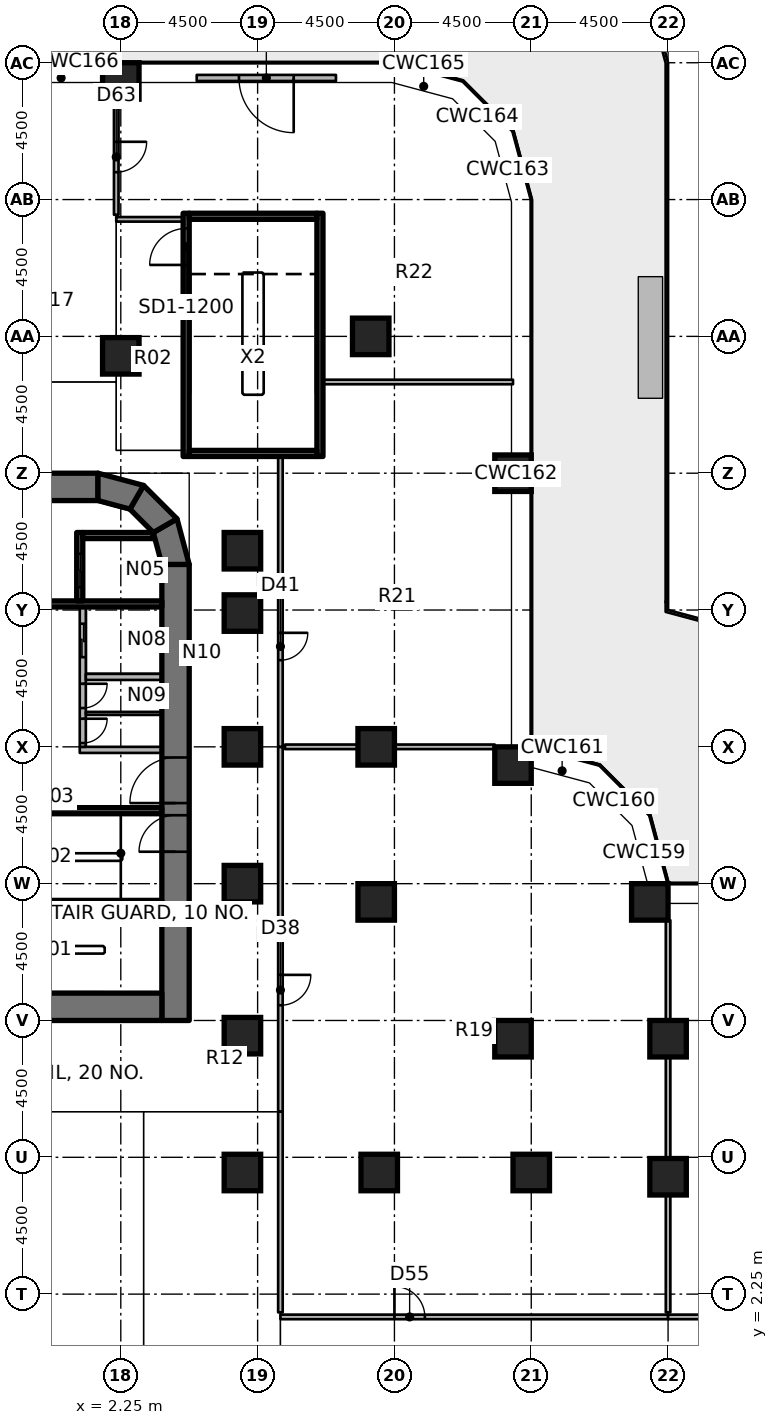
"""IFC4 building model, lengths in metres.
Left out: names, types, materials, properties, quantities, classifications, styles, units other than length and angle.
Written with IfcOpenShell. Run it as: python <this file> out.ifc"""

import sys

from ifc_helpers import new_model, si_unit, direction, frame, frame_2d, origin, origin_2d, place, context, subcontext, project, spatial, polyline, rectangle, outline, extrude, element, fill, save


model = new_model("IFC4")
c1 = context("Model", 3, precision=1e-05, world=origin(), true_north=direction((0.0, 1.0)))
c2 = subcontext(c1, "Body", "Model", "MODEL_VIEW")
j1 = project(units=[si_unit("LENGTHUNIT", "METRE"), si_unit("PLANEANGLEUNIT", "RADIAN")], contexts=[c1])
p1 = place(None, origin())
s1 = spatial("IfcSite", under=j1, at=p1, CompositionType="ELEMENT")
p2 = place(p1, origin())
s2 = spatial("IfcBuilding", under=s1, at=p2, CompositionType="ELEMENT")
p3 = place(p2, frame((0.0, 0.0, 17.0)))
s3 = spatial("IfcBuildingStorey", under=s2, at=p3, CompositionType="ELEMENT", Elevation=17.0)
for number, where, z_axis, x_axis in (
    (1, (2.25, 33.11, 0.0), (0.0, 0.0, 1.0), (1.0, 0.0, 0.0)),
    (2, (2.25, 42.15, 0.0), (0.0, 0.0, 1.0), (1.0, 0.0, 0.0)),
    (3, (6.25, 6.25, 0.0), (0.0, 0.0, 1.0), (1.0, 0.0, 0.0)),
    (4, (6.25, 10.75, 0.0), (0.0, 0.0, 1.0), (1.0, 0.0, 0.0)),
    (5, (6.25, 15.75, 0.0), (0.0, 0.0, 1.0), (1.0, 0.0, 0.0)),
    (6, (6.25, 20.25, 0.0), (0.0, 0.0, 1.0), (1.0, 0.0, 0.0)),
    (7, (6.25, 24.65, 0.0), (0.0, 0.0, 1.0), (1.0, 0.0, 0.0)),
    (8, (6.25, 26.7, 0.0), (0.0, 0.0, 1.0), (1.0, 0.0, 0.0)),
    (9, (10.75, 6.25, 0.0), (0.0, 0.0, 1.0), (1.0, 0.0, 0.0)),
    (10, (10.65, 15.15, 0.0), (0.0, 0.0, 1.0), (1.0, 0.0, 0.0)),
    (11, (10.65, 20.25, 0.0), (0.0, 0.0, 1.0), (1.0, 0.0, 0.0)),
    (12, (10.47, 33.75, 0.0), (0.0, 0.0, 1.0), (1.0, 0.0, 0.0)),
    (13, (15.75, 6.25, 0.0), (0.0, 0.0, 1.0), (1.0, 0.0, 0.0)),
    (14, (15.15, 10.65, 0.0), (0.0, 0.0, 1.0), (1.0, 0.0, 0.0)),
    (15, (15.15, 19.65, 0.0), (0.0, 0.0, 1.0), (1.0, 0.0, 0.0)),
    (16, (15.15, 29.25, 0.0), (0.0, 0.0, 1.0), (1.0, 0.0, 0.0)),
    (17, (20.25, 6.11, 0.0), (0.0, 0.0, 1.0), (1.0, 0.0, 0.0)),
    (18, (20.25, 10.65, 0.0), (0.0, 0.0, 1.0), (1.0, 0.0, 0.0)),
    (19, (19.65, 15.15, 0.0), (0.0, 0.0, 1.0), (1.0, 0.0, 0.0)),
):
    element("IfcColumn", number, at=place(p3, frame(where, z_axis=z_axis, x_axis=x_axis)), inside=s3, PredefinedType="COLUMN", context=c2, shape_type="SweptSolid", body=[
        extrude(rectangle(XDim=1.2, YDim=1.2, at=origin_2d()), origin(), (0.0, 0.0, 1.0), 4.55),
    ])
p4 = place(p3, frame((4.05, 11.25, 0.0), z_axis=(0.0, 0.0, 1.0), x_axis=(0.0, 1.0, 0.0)))
e20 = element("IfcWall", 20, at=p4, inside=s3, PredefinedType="SHEAR", context=c2, shape_type="SweptSolid", body=[
    extrude(rectangle(XDim=15.0, YDim=0.9, at=frame_2d((7.5, 0.0))), origin(), (0.0, 0.0, 1.0), 5.0),
])
p5 = place(p4, frame((7.15, 0.0, 0.0)))
e21 = element("IfcOpeningElement", 21, at=p5, cuts=e20, PredefinedType="OPENING", context=c2, shape_type="SweptSolid", body=[
    extrude(rectangle(XDim=1.5, YDim=2.3, at=frame_2d((0.75, 1.15))), frame((0.0, 0.46, 0.0), z_axis=(0.0, -1.0, 0.0), x_axis=(1.0, 0.0, 0.0)), (0.0, 0.0, 1.0), 0.92),
])
p6 = place(p4, frame((5.55, 0.0, 0.0)))
e22 = element("IfcOpeningElement", 22, at=p6, cuts=e20, PredefinedType="OPENING", context=c2, shape_type="SweptSolid", body=[
    extrude(rectangle(XDim=1.2, YDim=2.1, at=frame_2d((0.6, 1.05))), frame((0.0, 0.46, 0.0), z_axis=(0.0, -1.0, 0.0), x_axis=(1.0, 0.0, 0.0)), (0.0, 0.0, 1.0), 0.92),
])
p7 = place(p3, frame((-3.6, 11.7, 0.0), z_axis=(0.0, 0.0, 1.0), x_axis=(1.0, 0.0, 0.0)))
e23 = element("IfcWall", 23, at=p7, inside=s3, PredefinedType="SHEAR", context=c2, shape_type="SweptSolid", body=[
    extrude(rectangle(XDim=7.2, YDim=0.9, at=frame_2d((3.6, 0.0))), origin(), (0.0, 0.0, 1.0), 5.0),
])
p8 = place(p3, frame((-1.5, 28.8, 0.0), z_axis=(0.0, 0.0, 1.0), x_axis=(1.0, 0.0, 0.0)))
e24 = element("IfcWall", 24, at=p8, inside=s3, PredefinedType="SHEAR", context=c2, shape_type="SweptSolid", body=[
    extrude(rectangle(XDim=3.0, YDim=0.9, at=frame_2d((1.5, 0.0))), origin(), (0.0, 0.0, 1.0), 5.0),
])
p9 = place(p3, origin())
e25 = element("IfcWall", 25, at=p9, inside=s3, PredefinedType="SHEAR", context=c2, shape_type="SweptSolid", body=[
    extrude(outline(polyline([(4.5, 26.25), (4.098, 27.75), (3.319, 27.3), (3.6, 26.25), (4.5, 26.25)])), origin(), (0.0, 0.0, 1.0), 5.0),
])
p10 = place(p3, origin())
e26 = element("IfcWall", 26, at=p10, inside=s3, PredefinedType="SHEAR", context=c2, shape_type="SweptSolid", body=[
    extrude(outline(polyline([(4.098, 27.75), (3.0, 28.848), (2.55, 28.069), (3.319, 27.3), (4.098, 27.75)])), origin(), (0.0, 0.0, 1.0), 5.0),
])
p11 = place(p3, origin())
e27 = element("IfcWall", 27, at=p11, inside=s3, PredefinedType="SHEAR", context=c2, shape_type="SweptSolid", body=[
    extrude(outline(polyline([(3.0, 28.848), (1.5, 29.25), (1.5, 28.35), (2.55, 28.069), (3.0, 28.848)])), origin(), (0.0, 0.0, 1.0), 5.0),
])
p12 = place(p3, frame((9.327, 42.25, 0.0), z_axis=(0.0, 0.0, 1.0), x_axis=(-1.0, 0.0, 0.0)))
e28 = element("IfcWall", 28, at=p12, inside=s3, PredefinedType="SOLIDWALL", context=c2, shape_type="SweptSolid", body=[
    extrude(rectangle(XDim=4.58, YDim=0.2, at=frame_2d((2.29, 0.0))), origin(), (0.0, 0.0, 1.0), 4.55),
])
p13 = place(p12, frame((1.39, 0.0, 0.0)))
e29 = element("IfcOpeningElement", 29, at=p13, cuts=e28, PredefinedType="OPENING", context=c2, shape_type="SweptSolid", body=[
    extrude(rectangle(XDim=1.8, YDim=2.4, at=frame_2d((0.9, 1.2))), frame((0.0, 0.11, 0.0), z_axis=(0.0, -1.0, 0.0), x_axis=(1.0, 0.0, 0.0)), (0.0, 0.0, 1.0), 0.22),
])
p14 = place(p3, frame((-3.6, 24.95, 0.0), z_axis=(0.0, 0.0, 1.0), x_axis=(1.0, 0.0, 0.0)))
e30 = element("IfcWall", 30, at=p14, inside=s3, PredefinedType="SHEAR", context=c2, shape_type="SweptSolid", body=[
    extrude(rectangle(XDim=7.2, YDim=0.2, at=frame_2d((3.6, 0.0))), origin(), (0.0, 0.0, 1.0), 4.55),
])
p15 = place(p3, frame((0.9, 27.3, 0.0), z_axis=(0.0, 0.0, 1.0), x_axis=(0.0, -1.0, 0.0)))
e31 = element("IfcWall", 31, at=p15, inside=s3, PredefinedType="SHEAR", context=c2, shape_type="SweptSolid", body=[
    extrude(rectangle(XDim=2.25, YDim=0.2, at=frame_2d((1.125, 0.0))), origin(), (0.0, 0.0, 1.0), 4.55),
])
p16 = place(p15, frame((0.7, 0.0, 0.0)))
e32 = element("IfcOpeningElement", 32, at=p16, cuts=e31, PredefinedType="OPENING", context=c2, shape_type="SweptSolid", body=[
    extrude(rectangle(XDim=1.1, YDim=2.3, at=frame_2d((0.55, 1.15))), frame((0.0, 0.11, 0.0), z_axis=(0.0, -1.0, 0.0), x_axis=(1.0, 0.0, 0.0)), (0.0, 0.0, 1.0), 0.22),
])
p17 = place(p3, origin())
e33 = element("IfcWall", 33, at=p17, inside=s3, PredefinedType="SHEAR", context=c2, shape_type="SweptSolid", body=[
    extrude(outline(polyline([(1.0, 27.1), (3.341, 27.1), (3.291, 27.284), (3.275, 27.3), (1.0, 27.3), (1.0, 27.1)])), origin(), (0.0, 0.0, 1.0), 4.55),
])
for number, where, z_axis, x_axis in (
    (34, (-3.6, 18.15, 0.0), (0.0, 0.0, 1.0), (1.0, 0.0, 0.0)),
    (35, (-3.6, 15.1, 0.0), (0.0, 0.0, 1.0), (1.0, 0.0, 0.0)),
):
    element("IfcWall", number, at=place(p3, frame(where, z_axis=z_axis, x_axis=x_axis)), inside=s3, PredefinedType="SHEAR", context=c2, shape_type="SweptSolid", body=[
        extrude(rectangle(XDim=7.2, YDim=0.2, at=frame_2d((3.6, 0.0))), origin(), (0.0, 0.0, 1.0), 4.55),
    ])
p18 = place(p3, frame((0.9, 20.15, 0.0), z_axis=(0.0, 0.0, 1.0), x_axis=(1.0, 0.0, 0.0)))
e36 = element("IfcWall", 36, at=p18, inside=s3, PredefinedType="PARTITIONING", context=c2, shape_type="SweptSolid", body=[
    extrude(rectangle(XDim=2.7, YDim=0.2, at=frame_2d((1.35, 0.0))), origin(), (0.0, 0.0, 1.0), 4.55),
])
p19 = place(p3, frame((1.0, 24.85, 0.0), z_axis=(0.0, 0.0, 1.0), x_axis=(0.0, -1.0, 0.0)))
e37 = element("IfcWall", 37, at=p19, inside=s3, PredefinedType="PARTITIONING", context=c2, shape_type="SweptSolid", body=[
    extrude(rectangle(XDim=4.6, YDim=0.2, at=frame_2d((2.3, 0.0))), origin(), (0.0, 0.0, 1.0), 4.55),
])
p20 = place(p19, frame((0.55, 0.0, 0.0)))
e38 = element("IfcOpeningElement", 38, at=p20, cuts=e37, PredefinedType="OPENING", context=c2, shape_type="SweptSolid", body=[
    extrude(rectangle(XDim=1.1, YDim=2.3, at=frame_2d((0.55, 1.15))), frame((0.0, 0.11, 0.0), z_axis=(0.0, -1.0, 0.0), x_axis=(1.0, 0.0, 0.0)), (0.0, 0.0, 1.0), 0.22),
])
p21 = place(p19, frame((2.525, 0.0, 0.0)))
e39 = element("IfcOpeningElement", 39, at=p21, cuts=e37, PredefinedType="OPENING", context=c2, shape_type="SweptSolid", body=[
    extrude(rectangle(XDim=0.8, YDim=2.1, at=frame_2d((0.4, 1.05))), frame((0.0, 0.11, 0.0), z_axis=(0.0, -1.0, 0.0), x_axis=(1.0, 0.0, 0.0)), (0.0, 0.0, 1.0), 0.22),
])
p22 = place(p19, frame((3.675, 0.0, 0.0)))
e40 = element("IfcOpeningElement", 40, at=p22, cuts=e37, PredefinedType="OPENING", context=c2, shape_type="SweptSolid", body=[
    extrude(rectangle(XDim=0.8, YDim=2.1, at=frame_2d((0.4, 1.05))), frame((0.0, 0.11, 0.0), z_axis=(0.0, -1.0, 0.0), x_axis=(1.0, 0.0, 0.0)), (0.0, 0.0, 1.0), 0.22),
])
p23 = place(p3, frame((1.1, 22.55, 0.0), z_axis=(0.0, 0.0, 1.0), x_axis=(1.0, 0.0, 0.0)))
e41 = element("IfcWall", 41, at=p23, inside=s3, PredefinedType="PARTITIONING", context=c2, shape_type="SweptSolid", body=[
    extrude(rectangle(XDim=2.5, YDim=0.2, at=frame_2d((1.25, 0.0))), origin(), (0.0, 0.0, 1.0), 4.55),
])
p24 = place(p3, frame((1.1, 21.35, 0.0), z_axis=(0.0, 0.0, 1.0), x_axis=(1.0, 0.0, 0.0)))
e42 = element("IfcWall", 42, at=p24, inside=s3, PredefinedType="PARTITIONING", context=c2, shape_type="SweptSolid", body=[
    extrude(rectangle(XDim=2.5, YDim=0.1, at=frame_2d((1.25, 0.0))), origin(), (0.0, 0.0, 1.0), 4.55),
])
p25 = place(p3, frame((4.4, 29.8, 0.0), z_axis=(0.0, 0.0, 1.0), x_axis=(0.0, 1.0, 0.0)))
e43 = element("IfcWall", 43, at=p25, inside=s3, PredefinedType="SHEAR", context=c2, shape_type="SweptSolid", body=[
    extrude(rectangle(XDim=8.0, YDim=0.2, at=frame_2d((4.0, 0.0))), origin(), (0.0, 0.0, 1.0), 4.55),
])
p26 = place(p25, frame((6.3, 0.0, 0.0)))
e44 = element("IfcOpeningElement", 44, at=p26, cuts=e43, PredefinedType="OPENING", context=c2, shape_type="SweptSolid", body=[
    extrude(rectangle(XDim=1.2, YDim=2.1, at=frame_2d((0.6, 1.05))), frame((0.0, 0.11, 0.0), z_axis=(0.0, -1.0, 0.0), x_axis=(1.0, 0.0, 0.0)), (0.0, 0.0, 1.0), 0.22),
])
p27 = place(p3, frame((8.8, 29.8, 0.0), z_axis=(0.0, 0.0, 1.0), x_axis=(0.0, 1.0, 0.0)))
e45 = element("IfcWall", 45, at=p27, inside=s3, PredefinedType="SHEAR", context=c2, shape_type="SweptSolid", body=[
    extrude(rectangle(XDim=8.0, YDim=0.2, at=frame_2d((4.0, 0.0))), origin(), (0.0, 0.0, 1.0), 4.55),
])
for number, where, z_axis, x_axis in (
    (46, (4.5, 29.9, 0.0), (0.0, 0.0, 1.0), (1.0, 0.0, 0.0)),
    (47, (4.5, 37.7, 0.0), (0.0, 0.0, 1.0), (1.0, 0.0, 0.0)),
):
    element("IfcWall", number, at=place(p3, frame(where, z_axis=z_axis, x_axis=x_axis)), inside=s3, PredefinedType="SHEAR", context=c2, shape_type="SweptSolid", body=[
        extrude(rectangle(XDim=4.2, YDim=0.2, at=frame_2d((2.1, 0.0))), origin(), (0.0, 0.0, 1.0), 4.55),
    ])
p28 = place(p3, frame((2.1, 37.6, 0.0), z_axis=(0.0, 0.0, 1.0), x_axis=(1.0, 0.0, 0.0)))
e48 = element("IfcWall", 48, at=p28, inside=s3, PredefinedType="PARTITIONING", context=c2, shape_type="SweptSolid", body=[
    extrude(rectangle(XDim=2.2, YDim=0.15, at=frame_2d((1.1, 0.0))), origin(), (0.0, 0.0, 1.0), 4.55),
])
p29 = place(p3, frame((7.5, 20.25, 0.0), z_axis=(0.0, 0.0, 1.0), x_axis=(0.0, -1.0, 0.0)))
e49 = element("IfcWall", 49, at=p29, inside=s3, PredefinedType="PARTITIONING", context=c2, shape_type="SweptSolid", body=[
    extrude(rectangle(XDim=12.0, YDim=0.15, at=frame_2d((6.0, 0.0))), origin(), (0.0, 0.0, 1.0), 4.55),
])
p30 = place(p29, frame((7.5, 0.0, 0.0)))
e50 = element("IfcOpeningElement", 50, at=p30, cuts=e49, PredefinedType="OPENING", context=c2, shape_type="SweptSolid", body=[
    extrude(rectangle(XDim=1.0, YDim=2.1, at=frame_2d((0.5, 1.05))), frame((0.0, 0.085, 0.0), z_axis=(0.0, -1.0, 0.0), x_axis=(1.0, 0.0, 0.0)), (0.0, 0.0, 1.0), 0.17),
])
p31 = place(p3, frame((7.5, 30.0, 0.0), z_axis=(0.0, 0.0, 1.0), x_axis=(0.0, -1.0, 0.0)))
e51 = element("IfcWall", 51, at=p31, inside=s3, PredefinedType="PARTITIONING", context=c2, shape_type="SweptSolid", body=[
    extrude(rectangle(XDim=9.75, YDim=0.15, at=frame_2d((4.875, 0.0))), origin(), (0.0, 0.0, 1.0), 4.55),
])
p32 = place(p31, frame((6.0, 0.0, 0.0)))
e52 = element("IfcOpeningElement", 52, at=p32, cuts=e51, PredefinedType="OPENING", context=c2, shape_type="SweptSolid", body=[
    extrude(rectangle(XDim=0.9, YDim=2.1, at=frame_2d((0.45, 1.05))), frame((0.0, 0.085, 0.0), z_axis=(0.0, -1.0, 0.0), x_axis=(1.0, 0.0, 0.0)), (0.0, 0.0, 1.0), 0.17),
])
p33 = place(p3, frame((7.5, 1.5, 0.0), z_axis=(0.0, 0.0, 1.0), x_axis=(1.0, 0.0, 0.0)))
e53 = element("IfcWall", 53, at=p33, inside=s3, PredefinedType="PARTITIONING", context=c2, shape_type="SweptSolid", body=[
    extrude(rectangle(XDim=12.75, YDim=0.15, at=frame_2d((6.375, 0.0))), origin(), (0.0, 0.0, 1.0), 4.55),
])
p34 = place(p33, frame((3.75, 0.0, 0.0)))
e54 = element("IfcOpeningElement", 54, at=p34, cuts=e53, PredefinedType="OPENING", context=c2, shape_type="SweptSolid", body=[
    extrude(rectangle(XDim=1.0, YDim=2.1, at=frame_2d((0.5, 1.05))), frame((0.0, 0.085, 0.0), z_axis=(0.0, -1.0, 0.0), x_axis=(1.0, 0.0, 0.0)), (0.0, 0.0, 1.0), 0.17),
])
p35 = place(p3, frame((20.25, 1.5, 0.0), z_axis=(0.0, 0.0, 1.0), x_axis=(1.0, 0.0, 0.0)))
e55 = element("IfcWall", 55, at=p35, inside=s3, PredefinedType="PARTITIONING", context=c2, shape_type="SweptSolid", body=[
    extrude(rectangle(XDim=21.9, YDim=0.15, at=frame_2d((10.95, 0.0))), origin(), (0.0, 0.0, 1.0), 4.55),
])
p36 = place(p35, frame((10.8, 0.0, 0.0)))
e56 = element("IfcOpeningElement", 56, at=p36, cuts=e55, PredefinedType="OPENING", context=c2, shape_type="SweptSolid", body=[
    extrude(rectangle(XDim=0.9, YDim=2.1, at=frame_2d((0.45, 1.05))), frame((0.0, 0.085, 0.0), z_axis=(0.0, -1.0, 0.0), x_axis=(1.0, 0.0, 0.0)), (0.0, 0.0, 1.0), 0.17),
])
p37 = place(p3, frame((2.1, 41.55, 0.0), z_axis=(0.0, 0.0, 1.0), x_axis=(0.0, -1.0, 0.0)))
e57 = element("IfcWall", 57, at=p37, inside=s3, PredefinedType="PARTITIONING", context=c2, shape_type="SweptSolid", body=[
    extrude(rectangle(XDim=3.8, YDim=0.15, at=frame_2d((1.9, 0.0))), origin(), (0.0, 0.0, 1.0), 4.55),
])
p38 = place(p37, frame((1.4, 0.0, 0.0)))
e58 = element("IfcOpeningElement", 58, at=p38, cuts=e57, PredefinedType="OPENING", context=c2, shape_type="SweptSolid", body=[
    extrude(rectangle(XDim=1.0, YDim=2.1, at=frame_2d((0.5, 1.05))), frame((0.0, 0.085, 0.0), z_axis=(0.0, -1.0, 0.0), x_axis=(1.0, 0.0, 0.0)), (0.0, 0.0, 1.0), 0.17),
])
p39 = place(p3, frame((20.25, 14.55, 0.0), z_axis=(0.0, 0.0, 1.0), x_axis=(0.0, -1.0, 0.0)))
e59 = element("IfcWall", 59, at=p39, inside=s3, PredefinedType="PARTITIONING", context=c2, shape_type="SweptSolid", body=[
    extrude(rectangle(XDim=3.3, YDim=0.15, at=frame_2d((1.65, 0.0))), origin(), (0.0, 0.0, 1.0), 4.55),
])
p40 = place(p3, frame((20.25, 10.05, 0.0), z_axis=(0.0, 0.0, 1.0), x_axis=(0.0, -1.0, 0.0)))
e60 = element("IfcWall", 60, at=p40, inside=s3, PredefinedType="PARTITIONING", context=c2, shape_type="SweptSolid", body=[
    extrude(rectangle(XDim=3.34, YDim=0.15, at=frame_2d((1.67, 0.0))), origin(), (0.0, 0.0, 1.0), 4.55),
])
p41 = place(p3, frame((20.25, 5.51, 0.0), z_axis=(0.0, 0.0, 1.0), x_axis=(0.0, -1.0, 0.0)))
e61 = element("IfcWall", 61, at=p41, inside=s3, PredefinedType="PARTITIONING", context=c2, shape_type="SweptSolid", body=[
    extrude(rectangle(XDim=3.86, YDim=0.15, at=frame_2d((1.93, 0.0))), origin(), (0.0, 0.0, 1.0), 4.55),
])
p42 = place(p3, frame((7.65, 20.25, 0.0), z_axis=(0.0, 0.0, 1.0), x_axis=(1.0, 0.0, 0.0)))
e62 = element("IfcWall", 62, at=p42, inside=s3, PredefinedType="PARTITIONING", context=c2, shape_type="SweptSolid", body=[
    extrude(rectangle(XDim=2.4, YDim=0.15, at=frame_2d((1.2, 0.0))), origin(), (0.0, 0.0, 1.0), 4.55),
])
p43 = place(p3, frame((11.25, 20.25, 0.0), z_axis=(0.0, 0.0, 1.0), x_axis=(1.0, 0.0, 0.0)))
e63 = element("IfcWall", 63, at=p43, inside=s3, PredefinedType="PARTITIONING", context=c2, shape_type="SweptSolid", body=[
    extrude(rectangle(XDim=3.3, YDim=0.15, at=frame_2d((1.65, 0.0))), origin(), (0.0, 0.0, 1.0), 4.55),
])
p44 = place(p3, frame((7.5, 1.65, 0.0), z_axis=(0.0, 0.0, 1.0), x_axis=(0.0, 1.0, 0.0)))
e64 = element("IfcWall", 64, at=p44, inside=s3, PredefinedType="PARTITIONING", context=c2, shape_type="SweptSolid", body=[
    extrude(rectangle(XDim=6.6, YDim=0.15, at=frame_2d((3.3, 0.0))), origin(), (0.0, 0.0, 1.0), 4.55),
])
p45 = place(p3, frame((8.9, 32.25, 0.0), z_axis=(0.0, 0.0, 1.0), x_axis=(1.0, 0.0, 0.0)))
e65 = element("IfcWall", 65, at=p45, inside=s3, PredefinedType="PARTITIONING", context=c2, shape_type="SweptSolid", body=[
    extrude(rectangle(XDim=6.25, YDim=0.15, at=frame_2d((3.125, 0.0))), origin(), (0.0, 0.0, 1.0), 4.55),
])
p46 = place(p13, origin())
e66 = element("IfcDoor", 66, at=p46, inside=s3, OperationType="SINGLE_SWING_LEFT", PredefinedType="DOOR", context=c2, shape_type="SweptSolid", body=[
    extrude(rectangle(XDim=1.8, YDim=2.4, at=frame_2d((0.9, 1.2))), frame((0.0, 0.025, 0.0), z_axis=(0.0, -1.0, 0.0), x_axis=(1.0, 0.0, 0.0)), (0.0, 0.0, 1.0), 0.05),
])
fill(e29, e66)
p47 = place(p5, origin())
e67 = element("IfcDoor", 67, at=p47, inside=s3, OperationType="DOUBLE_DOOR_SINGLE_SWING", PredefinedType="DOOR", context=c2, shape_type="SweptSolid", body=[
    extrude(rectangle(XDim=1.5, YDim=2.3, at=frame_2d((0.75, 1.15))), frame((0.0, 0.025, 0.0), z_axis=(0.0, -1.0, 0.0), x_axis=(1.0, 0.0, 0.0)), (0.0, 0.0, 1.0), 0.05),
])
fill(e21, e67)
p48 = place(p6, origin())
e68 = element("IfcDoor", 68, at=p48, inside=s3, OperationType="SINGLE_SWING_LEFT", PredefinedType="DOOR", context=c2, shape_type="SweptSolid", body=[
    extrude(rectangle(XDim=1.2, YDim=2.1, at=frame_2d((0.6, 1.05))), frame((0.0, 0.025, 0.0), z_axis=(0.0, -1.0, 0.0), x_axis=(1.0, 0.0, 0.0)), (0.0, 0.0, 1.0), 0.05),
])
fill(e22, e68)
p49 = place(p16, origin())
e69 = element("IfcDoor", 69, at=p49, inside=s3, OperationType="DOUBLE_DOOR_SLIDING", PredefinedType="DOOR", context=c2, shape_type="SweptSolid", body=[
    extrude(rectangle(XDim=1.1, YDim=2.3, at=frame_2d((0.55, 1.15))), frame((0.0, 0.025, 0.0), z_axis=(0.0, -1.0, 0.0), x_axis=(1.0, 0.0, 0.0)), (0.0, 0.0, 1.0), 0.05),
])
fill(e32, e69)
p50 = place(p20, origin())
e70 = element("IfcDoor", 70, at=p50, inside=s3, OperationType="DOUBLE_DOOR_SLIDING", PredefinedType="DOOR", context=c2, shape_type="SweptSolid", body=[
    extrude(rectangle(XDim=1.1, YDim=2.3, at=frame_2d((0.55, 1.15))), frame((0.0, 0.025, 0.0), z_axis=(0.0, -1.0, 0.0), x_axis=(1.0, 0.0, 0.0)), (0.0, 0.0, 1.0), 0.05),
])
fill(e38, e70)
p51 = place(p21, origin())
e71 = element("IfcDoor", 71, at=p51, inside=s3, OperationType="SINGLE_SWING_RIGHT", PredefinedType="DOOR", context=c2, shape_type="SweptSolid", body=[
    extrude(rectangle(XDim=0.8, YDim=2.1, at=frame_2d((0.4, 1.05))), frame((0.0, 0.025, 0.0), z_axis=(0.0, -1.0, 0.0), x_axis=(1.0, 0.0, 0.0)), (0.0, 0.0, 1.0), 0.05),
])
fill(e39, e71)
p52 = place(p22, origin())
e72 = element("IfcDoor", 72, at=p52, inside=s3, OperationType="SINGLE_SWING_RIGHT", PredefinedType="DOOR", context=c2, shape_type="SweptSolid", body=[
    extrude(rectangle(XDim=0.8, YDim=2.1, at=frame_2d((0.4, 1.05))), frame((0.0, 0.025, 0.0), z_axis=(0.0, -1.0, 0.0), x_axis=(1.0, 0.0, 0.0)), (0.0, 0.0, 1.0), 0.05),
])
fill(e40, e72)
p53 = place(p26, origin())
e73 = element("IfcDoor", 73, at=p53, inside=s3, OperationType="SINGLE_SWING_LEFT", PredefinedType="DOOR", context=c2, shape_type="SweptSolid", body=[
    extrude(rectangle(XDim=1.2, YDim=2.1, at=frame_2d((0.6, 1.05))), frame((0.0, 0.025, 0.0), z_axis=(0.0, -1.0, 0.0), x_axis=(1.0, 0.0, 0.0)), (0.0, 0.0, 1.0), 0.05),
])
fill(e44, e73)
p54 = place(p30, origin())
e74 = element("IfcDoor", 74, at=p54, inside=s3, OperationType="SINGLE_SWING_LEFT", PredefinedType="DOOR", context=c2, shape_type="SweptSolid", body=[
    extrude(rectangle(XDim=1.0, YDim=2.1, at=frame_2d((0.5, 1.05))), frame((0.0, 0.025, 0.0), z_axis=(0.0, -1.0, 0.0), x_axis=(1.0, 0.0, 0.0)), (0.0, 0.0, 1.0), 0.05),
])
fill(e50, e74)
p55 = place(p32, origin())
e75 = element("IfcDoor", 75, at=p55, inside=s3, OperationType="SINGLE_SWING_LEFT", PredefinedType="DOOR", context=c2, shape_type="SweptSolid", body=[
    extrude(rectangle(XDim=0.9, YDim=2.1, at=frame_2d((0.45, 1.05))), frame((0.0, 0.025, 0.0), z_axis=(0.0, -1.0, 0.0), x_axis=(1.0, 0.0, 0.0)), (0.0, 0.0, 1.0), 0.05),
])
fill(e52, e75)
p56 = place(p34, origin())
e76 = element("IfcDoor", 76, at=p56, inside=s3, OperationType="SINGLE_SWING_LEFT", PredefinedType="DOOR", context=c2, shape_type="SweptSolid", body=[
    extrude(rectangle(XDim=1.0, YDim=2.1, at=frame_2d((0.5, 1.05))), frame((0.0, 0.025, 0.0), z_axis=(0.0, -1.0, 0.0), x_axis=(1.0, 0.0, 0.0)), (0.0, 0.0, 1.0), 0.05),
])
fill(e54, e76)
p57 = place(p38, origin())
e77 = element("IfcDoor", 77, at=p57, inside=s3, OperationType="SINGLE_SWING_LEFT", PredefinedType="DOOR", context=c2, shape_type="SweptSolid", body=[
    extrude(rectangle(XDim=1.0, YDim=2.1, at=frame_2d((0.5, 1.05))), frame((0.0, 0.025, 0.0), z_axis=(0.0, -1.0, 0.0), x_axis=(1.0, 0.0, 0.0)), (0.0, 0.0, 1.0), 0.05),
])
fill(e58, e77)
save(model, sys.argv[1])
